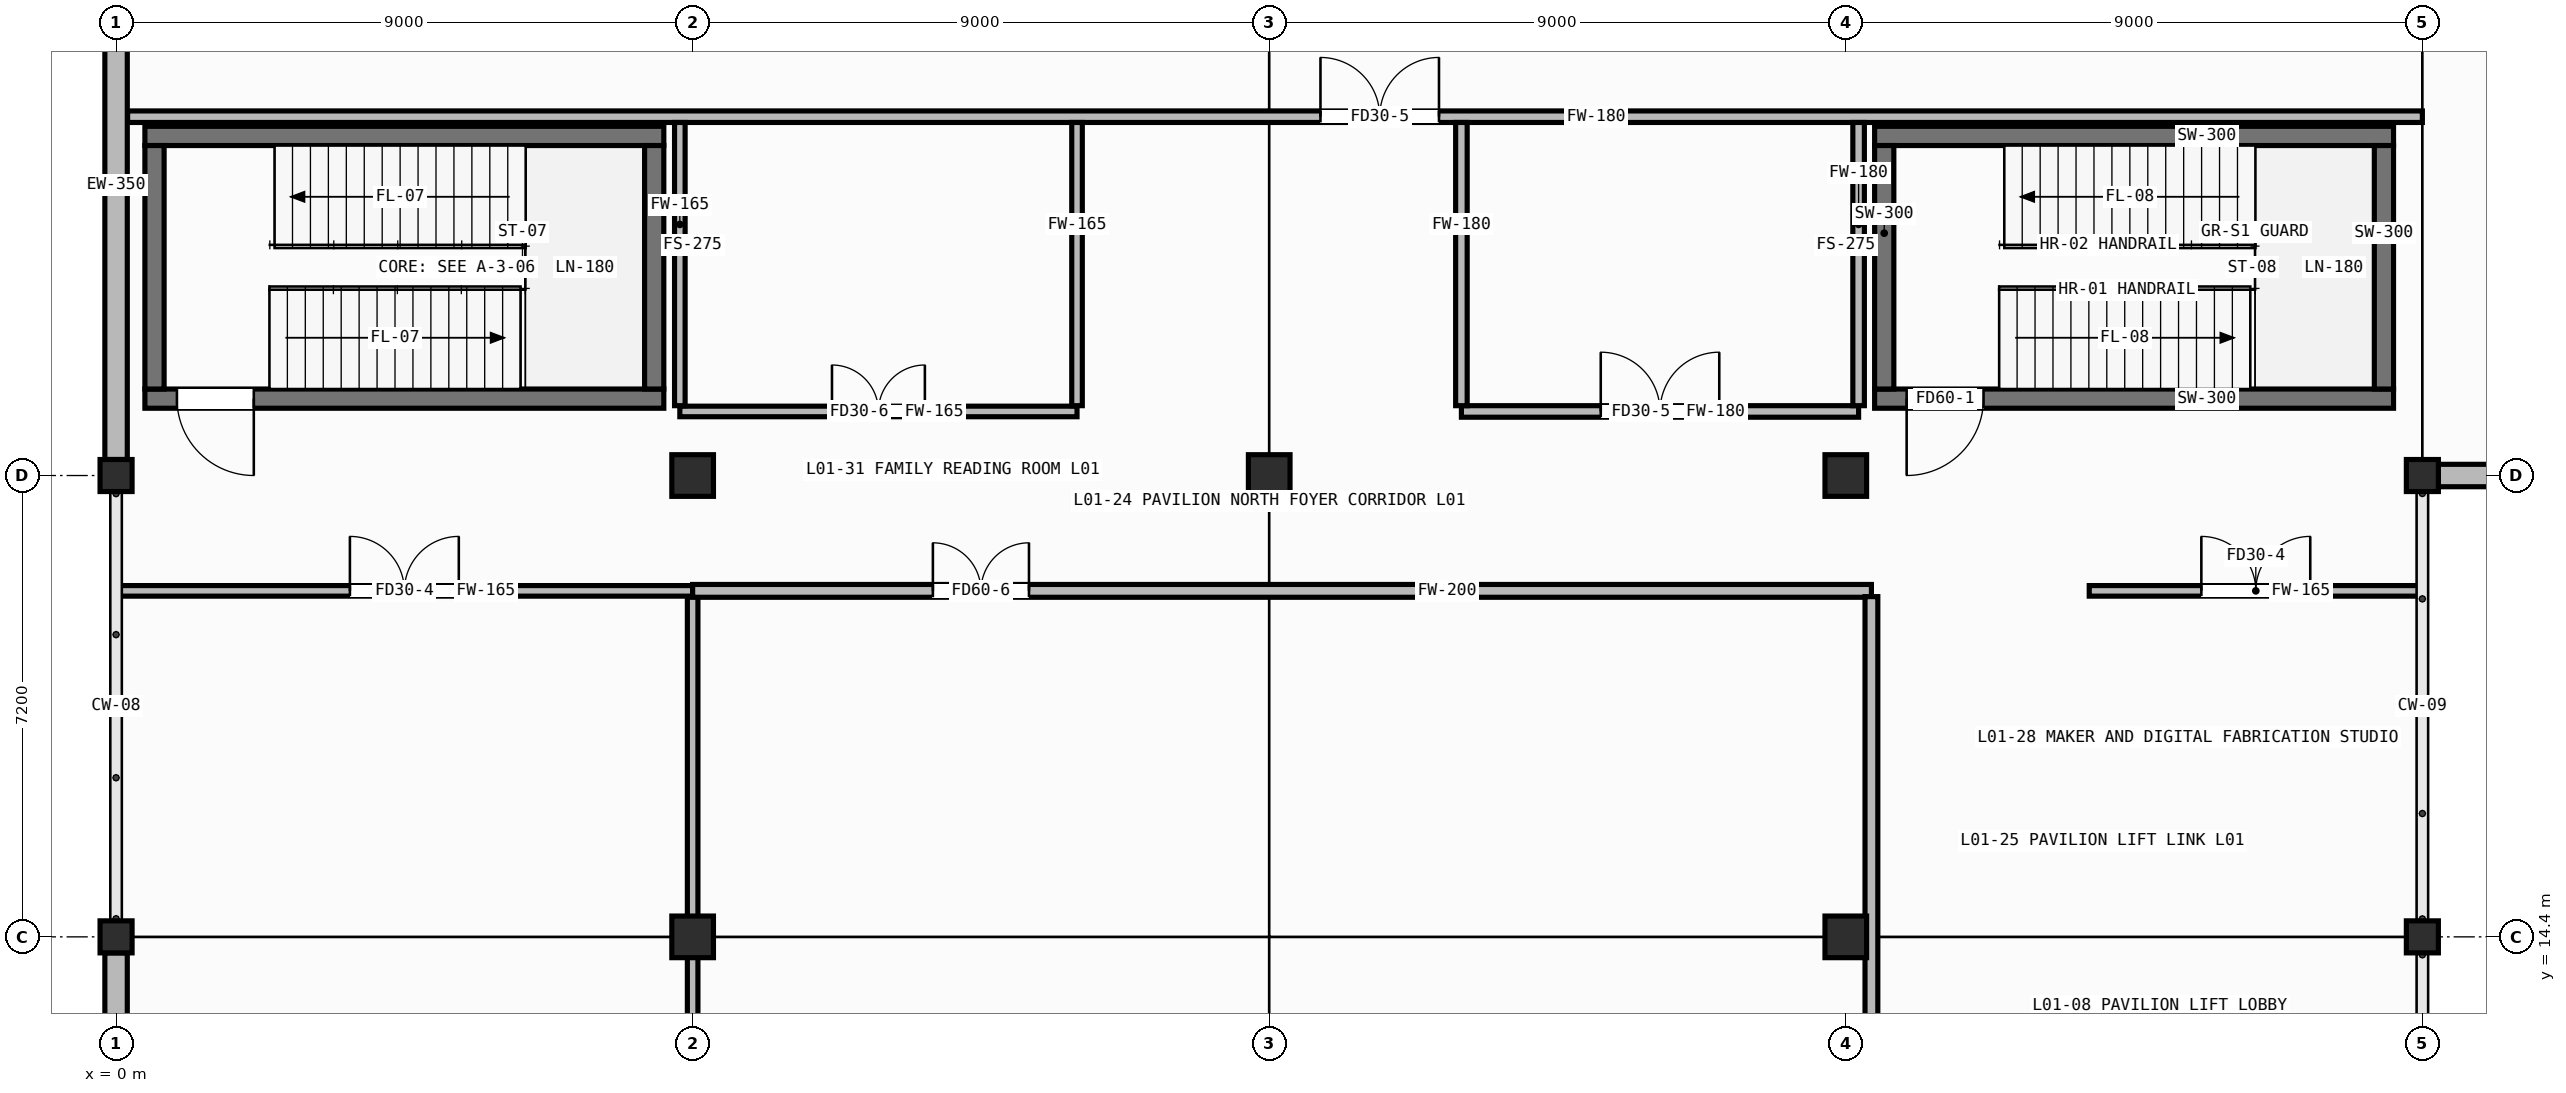
"""IFC4 building model, lengths in metres.
Left out: names, types, materials, properties, quantities, classifications, styles, units other than length and angle.
Written with IfcOpenShell. Run it as: python <this file> out.ifc"""

import sys

from ifc_helpers import new_model, si_unit, direction, frame, frame_2d, origin, origin_2d, place, context, subcontext, project, spatial, rectangle, hollow_rectangle, extrude, element, fill, save


model = new_model("IFC4")
c1 = context("Model", 3, precision=1e-05, world=origin(), true_north=direction((0.0, 1.0)))
c2 = subcontext(c1, "Body", "Model", "MODEL_VIEW")
j1 = project(units=[si_unit("LENGTHUNIT", "METRE"), si_unit("PLANEANGLEUNIT", "RADIAN")], contexts=[c1])
p1 = place(None, origin())
s1 = spatial("IfcSite", under=j1, at=p1, CompositionType="ELEMENT")
p2 = place(p1, origin())
s2 = spatial("IfcBuilding", under=s1, at=p2, CompositionType="ELEMENT")
p3 = place(p2, origin())
s3 = spatial("IfcBuildingStorey", under=s2, at=p3, CompositionType="ELEMENT", Elevation=0.0)
for number, where, z_axis, x_axis in (
    (1, (0.0, 14.4, 0.0), (0.0, 0.0, 1.0), (1.0, 0.0, 0.0)),
    (2, (0.0, 21.6, 0.0), (0.0, 0.0, 1.0), (1.0, 0.0, 0.0)),
):
    element("IfcColumn", number, at=place(p3, frame(where, z_axis=z_axis, x_axis=x_axis)), inside=s3, PredefinedType="COLUMN", context=c2, shape_type="SweptSolid", body=[
        extrude(hollow_rectangle(XDim=0.5, YDim=0.5, WallThickness=0.022, at=origin_2d()), origin(), (0.0, 0.0, 1.0), 4.8),
    ])
for number, where, z_axis, x_axis in (
    (3, (9.0, 14.4, 0.0), (0.0, 0.0, 1.0), (1.0, 0.0, 0.0)),
    (4, (9.0, 21.6, 0.0), (0.0, 0.0, 1.0), (1.0, 0.0, 0.0)),
    (5, (18.0, 21.6, 0.0), (0.0, 0.0, 1.0), (1.0, 0.0, 0.0)),
    (6, (27.0, 14.4, 0.0), (0.0, 0.0, 1.0), (1.0, 0.0, 0.0)),
    (7, (27.0, 21.6, 0.0), (0.0, 0.0, 1.0), (1.0, 0.0, 0.0)),
):
    element("IfcColumn", number, at=place(p3, frame(where, z_axis=z_axis, x_axis=x_axis)), inside=s3, PredefinedType="COLUMN", context=c2, shape_type="SweptSolid", body=[
        extrude(hollow_rectangle(XDim=0.65, YDim=0.65, WallThickness=0.025, at=origin_2d()), origin(), (0.0, 0.0, 1.0), 4.8),
    ])
for number, where, z_axis, x_axis in (
    (8, (36.0, 14.4, 0.0), (0.0, 0.0, 1.0), (1.0, 0.0, 0.0)),
    (9, (36.0, 21.6, 0.0), (0.0, 0.0, 1.0), (1.0, 0.0, 0.0)),
):
    element("IfcColumn", number, at=place(p3, frame(where, z_axis=z_axis, x_axis=x_axis)), inside=s3, PredefinedType="COLUMN", context=c2, shape_type="SweptSolid", body=[
        extrude(hollow_rectangle(XDim=0.5, YDim=0.5, WallThickness=0.022, at=origin_2d()), origin(), (0.0, 0.0, 1.0), 4.8),
    ])
p4 = place(p3, frame((36.25, 21.6, 0.0), z_axis=(0.0, 0.0, 1.0), x_axis=(1.0, 0.0, 0.0)))
e10 = element("IfcWall", 10, at=p4, inside=s3, PredefinedType="STANDARD", context=c2, shape_type="SweptSolid", body=[
    extrude(rectangle(XDim=8.5, YDim=0.35, at=frame_2d((4.25, 0.0))), origin(), (0.0, 0.0, 1.0), 4.055),
])
p5 = place(p4, frame((3.05, 0.0, 0.0)))
e11 = element("IfcOpeningElement", 11, at=p5, cuts=e10, PredefinedType="OPENING", context=c2, shape_type="SweptSolid", body=[
    extrude(rectangle(XDim=2.4, YDim=2.55, at=frame_2d((1.2, 1.275))), frame((0.0, 0.187, 0.0), z_axis=(0.0, -1.0, 0.0), x_axis=(1.0, 0.0, 0.0)), (0.0, 0.0, 1.0), 0.374),
])
p6 = place(p3, frame((0.0, 7.45, 0.0), z_axis=(0.0, 0.0, 1.0), x_axis=(0.0, 1.0, 0.0)))
e12 = element("IfcWall", 12, at=p6, inside=s3, PredefinedType="STANDARD", context=c2, shape_type="SweptSolid", body=[
    extrude(rectangle(XDim=6.7, YDim=0.35, at=frame_2d((3.35, 0.0))), origin(), (0.0, 0.0, 1.0), 4.055),
])
p7 = place(p6, frame((2.275, 0.0, 0.0)))
e13 = element("IfcOpeningElement", 13, at=p7, cuts=e12, PredefinedType="OPENING", context=c2, shape_type="SweptSolid", body=[
    extrude(rectangle(XDim=2.15, YDim=2.48, at=frame_2d((1.075, 1.24))), frame((0.0, 0.187, 0.0), z_axis=(0.0, -1.0, 0.0), x_axis=(1.0, 0.0, 0.0)), (0.0, 0.0, 1.0), 0.374),
])
p8 = place(p3, frame((0.0, 21.85, 0.0), z_axis=(0.0, 0.0, 1.0), x_axis=(0.0, 1.0, 0.0)))
e14 = element("IfcWall", 14, at=p8, inside=s3, PredefinedType="STANDARD", context=c2, shape_type="SweptSolid", body=[
    extrude(rectangle(XDim=6.7, YDim=0.35, at=frame_2d((3.35, 0.0))), origin(), (0.0, 0.0, 1.0), 4.055),
])
p9 = place(p3, frame((0.45, 22.8, 0.0), z_axis=(0.0, 0.0, 1.0), x_axis=(1.0, 0.0, 0.0)))
e15 = element("IfcWall", 15, at=p9, inside=s3, PredefinedType="SHEAR", context=c2, shape_type="SweptSolid", body=[
    extrude(rectangle(XDim=8.1, YDim=0.3, at=frame_2d((4.05, 0.0))), origin(), (0.0, 0.0, 1.0), 4.555),
])
p10 = place(p9, frame((0.5, 0.0, 0.0)))
e16 = element("IfcOpeningElement", 16, at=p10, cuts=e15, PredefinedType="OPENING", context=c2, shape_type="SweptSolid", body=[
    extrude(rectangle(XDim=1.2, YDim=2.1, at=frame_2d((0.6, 1.05))), frame((0.0, 0.162, 0.0), z_axis=(0.0, -1.0, 0.0), x_axis=(1.0, 0.0, 0.0)), (0.0, 0.0, 1.0), 0.324),
])
p11 = place(p3, frame((0.45, 26.9, 0.0), z_axis=(0.0, 0.0, 1.0), x_axis=(1.0, 0.0, 0.0)))
e17 = element("IfcWall", 17, at=p11, inside=s3, PredefinedType="SHEAR", context=c2, shape_type="SweptSolid", body=[
    extrude(rectangle(XDim=8.1, YDim=0.3, at=frame_2d((4.05, 0.0))), origin(), (0.0, 0.0, 1.0), 4.555),
])
for number, where, z_axis, x_axis in (
    (18, (0.6, 22.95, 0.0), (0.0, 0.0, 1.0), (0.0, 1.0, 0.0)),
    (19, (8.4, 22.95, 0.0), (0.0, 0.0, 1.0), (0.0, 1.0, 0.0)),
):
    element("IfcWall", number, at=place(p3, frame(where, z_axis=z_axis, x_axis=x_axis)), inside=s3, PredefinedType="SHEAR", context=c2, shape_type="SweptSolid", body=[
        extrude(rectangle(XDim=3.8, YDim=0.3, at=frame_2d((1.9, 0.0))), origin(), (0.0, 0.0, 1.0), 4.555),
    ])
p12 = place(p3, frame((27.45, 22.8, 0.0), z_axis=(0.0, 0.0, 1.0), x_axis=(1.0, 0.0, 0.0)))
e20 = element("IfcWall", 20, at=p12, inside=s3, PredefinedType="SHEAR", context=c2, shape_type="SweptSolid", body=[
    extrude(rectangle(XDim=8.1, YDim=0.3, at=frame_2d((4.05, 0.0))), origin(), (0.0, 0.0, 1.0), 4.555),
])
p13 = place(p12, frame((0.5, 0.0, 0.0)))
e21 = element("IfcOpeningElement", 21, at=p13, cuts=e20, PredefinedType="OPENING", context=c2, shape_type="SweptSolid", body=[
    extrude(rectangle(XDim=1.2, YDim=2.1, at=frame_2d((0.6, 1.05))), frame((0.0, 0.162, 0.0), z_axis=(0.0, -1.0, 0.0), x_axis=(1.0, 0.0, 0.0)), (0.0, 0.0, 1.0), 0.324),
])
p14 = place(p3, frame((27.45, 26.9, 0.0), z_axis=(0.0, 0.0, 1.0), x_axis=(1.0, 0.0, 0.0)))
e22 = element("IfcWall", 22, at=p14, inside=s3, PredefinedType="SHEAR", context=c2, shape_type="SweptSolid", body=[
    extrude(rectangle(XDim=8.1, YDim=0.3, at=frame_2d((4.05, 0.0))), origin(), (0.0, 0.0, 1.0), 4.555),
])
for number, where, z_axis, x_axis in (
    (23, (27.6, 22.95, 0.0), (0.0, 0.0, 1.0), (0.0, 1.0, 0.0)),
    (24, (35.4, 22.95, 0.0), (0.0, 0.0, 1.0), (0.0, 1.0, 0.0)),
):
    element("IfcWall", number, at=place(p3, frame(where, z_axis=z_axis, x_axis=x_axis)), inside=s3, PredefinedType="SHEAR", context=c2, shape_type="SweptSolid", body=[
        extrude(rectangle(XDim=3.8, YDim=0.3, at=frame_2d((1.9, 0.0))), origin(), (0.0, 0.0, 1.0), 4.555),
    ])
p15 = place(p3, frame((0.035, 19.8, 0.0), z_axis=(0.0, 0.0, 1.0), x_axis=(1.0, 0.0, 0.0)))
e25 = element("IfcWall", 25, at=p15, inside=s3, PredefinedType="PARTITIONING", context=c2, shape_type="SweptSolid", body=[
    extrude(rectangle(XDim=8.965, YDim=0.165, at=frame_2d((4.482, 0.0))), origin(), (0.0, 0.0, 1.0), 4.555),
])
p16 = place(p15, frame((3.615, 0.0, 0.0)))
e26 = element("IfcOpeningElement", 26, at=p16, cuts=e25, PredefinedType="OPENING", context=c2, shape_type="SweptSolid", body=[
    extrude(rectangle(XDim=1.7, YDim=2.12, at=frame_2d((0.85, 1.06))), frame((0.0, 0.094, 0.0), z_axis=(0.0, -1.0, 0.0), x_axis=(1.0, 0.0, 0.0)), (0.0, 0.0, 1.0), 0.189),
])
p17 = place(p3, frame((9.0, 0.6, 0.0), z_axis=(0.0, 0.0, 1.0), x_axis=(0.0, 1.0, 0.0)))
e27 = element("IfcWall", 27, at=p17, inside=s3, PredefinedType="PARTITIONING", context=c2, shape_type="SweptSolid", body=[
    extrude(rectangle(XDim=19.11, YDim=0.165, at=frame_2d((9.555, 0.0))), origin(), (0.0, 0.0, 1.0), 3.835),
])
p18 = place(p3, frame((9.0, 19.8, 0.0), z_axis=(0.0, 0.0, 1.0), x_axis=(1.0, 0.0, 0.0)))
e28 = element("IfcWall", 28, at=p18, inside=s3, PredefinedType="PARTITIONING", context=c2, shape_type="SweptSolid", body=[
    extrude(rectangle(XDim=18.4, YDim=0.2, at=frame_2d((9.2, 0.0))), origin(), (0.0, 0.0, 1.0), 4.555),
])
p19 = place(p18, frame((3.75, 0.0, 0.0)))
e29 = element("IfcOpeningElement", 29, at=p19, cuts=e28, PredefinedType="OPENING", context=c2, shape_type="SweptSolid", body=[
    extrude(rectangle(XDim=1.5, YDim=2.1, at=frame_2d((0.75, 1.05))), frame((0.0, 0.112, 0.0), z_axis=(0.0, -1.0, 0.0), x_axis=(1.0, 0.0, 0.0)), (0.0, 0.0, 1.0), 0.224),
])
p20 = place(p3, frame((27.4, 0.18, 0.0), z_axis=(0.0, 0.0, 1.0), x_axis=(0.0, 1.0, 0.0)))
e30 = element("IfcWall", 30, at=p20, inside=s3, PredefinedType="PARTITIONING", context=c2, shape_type="SweptSolid", body=[
    extrude(rectangle(XDim=19.53, YDim=0.2, at=frame_2d((9.765, 0.0))), origin(), (0.0, 0.0, 1.0), 4.555),
])
p21 = place(p3, frame((30.8, 19.8, 0.0), z_axis=(0.0, 0.0, 1.0), x_axis=(1.0, 0.0, 0.0)))
e31 = element("IfcWall", 31, at=p21, inside=s3, PredefinedType="PARTITIONING", context=c2, shape_type="SweptSolid", body=[
    extrude(rectangle(XDim=5.165, YDim=0.165, at=frame_2d((2.583, 0.0))), origin(), (0.0, 0.0, 1.0), 4.555),
])
p22 = place(p21, frame((1.75, 0.0, 0.0)))
e32 = element("IfcOpeningElement", 32, at=p22, cuts=e31, PredefinedType="OPENING", context=c2, shape_type="SweptSolid", body=[
    extrude(rectangle(XDim=1.7, YDim=2.12, at=frame_2d((0.85, 1.06))), frame((0.0, 0.094, 0.0), z_axis=(0.0, -1.0, 0.0), x_axis=(1.0, 0.0, 0.0)), (0.0, 0.0, 1.0), 0.189),
])
p23 = place(p3, frame((0.18, 27.2, 0.0), z_axis=(0.0, 0.0, 1.0), x_axis=(1.0, 0.0, 0.0)))
e33 = element("IfcWall", 33, at=p23, inside=s3, PredefinedType="PARTITIONING", context=c2, shape_type="SweptSolid", body=[
    extrude(rectangle(XDim=35.82, YDim=0.18, at=frame_2d((17.91, 0.0))), origin(), (0.0, 0.0, 1.0), 4.555),
])
p24 = place(p23, frame((18.62, 0.0, 0.0)))
e34 = element("IfcOpeningElement", 34, at=p24, cuts=e33, PredefinedType="OPENING", context=c2, shape_type="SweptSolid", body=[
    extrude(rectangle(XDim=1.85, YDim=2.12, at=frame_2d((0.925, 1.06))), frame((0.0, 0.102, 0.0), z_axis=(0.0, -1.0, 0.0), x_axis=(1.0, 0.0, 0.0)), (0.0, 0.0, 1.0), 0.204),
])
p25 = place(p3, frame((8.8, 22.6, 0.0), z_axis=(0.0, 0.0, 1.0), x_axis=(1.0, 0.0, 0.0)))
e35 = element("IfcWall", 35, at=p25, inside=s3, PredefinedType="PARTITIONING", context=c2, shape_type="SweptSolid", body=[
    extrude(rectangle(XDim=6.2, YDim=0.165, at=frame_2d((3.1, 0.0))), origin(), (0.0, 0.0, 1.0), 4.555),
])
p26 = place(p25, frame((2.375, 0.0, 0.0)))
e36 = element("IfcOpeningElement", 36, at=p26, cuts=e35, PredefinedType="OPENING", context=c2, shape_type="SweptSolid", body=[
    extrude(rectangle(XDim=1.45, YDim=2.1, at=frame_2d((0.725, 1.05))), frame((0.0, 0.094, 0.0), z_axis=(0.0, -1.0, 0.0), x_axis=(1.0, 0.0, 0.0)), (0.0, 0.0, 1.0), 0.189),
])
p27 = place(p3, frame((8.8, 22.69, 0.0), z_axis=(0.0, 0.0, 1.0), x_axis=(0.0, 1.0, 0.0)))
e37 = element("IfcWall", 37, at=p27, inside=s3, PredefinedType="PARTITIONING", context=c2, shape_type="SweptSolid", body=[
    extrude(rectangle(XDim=4.42, YDim=0.165, at=frame_2d((2.21, 0.0))), origin(), (0.0, 0.0, 1.0), 3.835),
])
p28 = place(p3, frame((15.0, 22.69, 0.0), z_axis=(0.0, 0.0, 1.0), x_axis=(0.0, 1.0, 0.0)))
e38 = element("IfcWall", 38, at=p28, inside=s3, PredefinedType="PARTITIONING", context=c2, shape_type="SweptSolid", body=[
    extrude(rectangle(XDim=4.42, YDim=0.165, at=frame_2d((2.21, 0.0))), origin(), (0.0, 0.0, 1.0), 4.555),
])
p29 = place(p3, frame((21.0, 22.6, 0.0), z_axis=(0.0, 0.0, 1.0), x_axis=(1.0, 0.0, 0.0)))
e39 = element("IfcWall", 39, at=p29, inside=s3, PredefinedType="PARTITIONING", context=c2, shape_type="SweptSolid", body=[
    extrude(rectangle(XDim=6.2, YDim=0.18, at=frame_2d((3.1, 0.0))), origin(), (0.0, 0.0, 1.0), 4.555),
])
p30 = place(p29, frame((2.175, 0.0, 0.0)))
e40 = element("IfcOpeningElement", 40, at=p30, cuts=e39, PredefinedType="OPENING", context=c2, shape_type="SweptSolid", body=[
    extrude(rectangle(XDim=1.85, YDim=2.12, at=frame_2d((0.925, 1.06))), frame((0.0, 0.102, 0.0), z_axis=(0.0, -1.0, 0.0), x_axis=(1.0, 0.0, 0.0)), (0.0, 0.0, 1.0), 0.204),
])
p31 = place(p3, frame((21.0, 22.69, 0.0), z_axis=(0.0, 0.0, 1.0), x_axis=(0.0, 1.0, 0.0)))
e41 = element("IfcWall", 41, at=p31, inside=s3, PredefinedType="PARTITIONING", context=c2, shape_type="SweptSolid", body=[
    extrude(rectangle(XDim=4.42, YDim=0.18, at=frame_2d((2.21, 0.0))), origin(), (0.0, 0.0, 1.0), 4.555),
])
p32 = place(p3, frame((27.2, 22.69, 0.0), z_axis=(0.0, 0.0, 1.0), x_axis=(0.0, 1.0, 0.0)))
e42 = element("IfcWall", 42, at=p32, inside=s3, PredefinedType="PARTITIONING", context=c2, shape_type="SweptSolid", body=[
    extrude(rectangle(XDim=4.42, YDim=0.18, at=frame_2d((2.21, 0.0))), origin(), (0.0, 0.0, 1.0), 3.835),
])
p33 = place(p10, frame((1.2, 0.0, 0.0), z_axis=(0.0, 0.0, 1.0), x_axis=(-1.0, 0.0, 0.0)))
e43 = element("IfcDoor", 43, at=p33, inside=s3, OperationType="SINGLE_SWING_LEFT", PredefinedType="DOOR", context=c2, shape_type="SweptSolid", body=[
    extrude(rectangle(XDim=1.2, YDim=2.1, at=frame_2d((0.6, 1.05))), frame((0.0, 0.025, 0.0), z_axis=(0.0, -1.0, 0.0), x_axis=(1.0, 0.0, 0.0)), (0.0, 0.0, 1.0), 0.05),
])
fill(e16, e43)
p34 = place(p13, frame((1.2, 0.0, 0.0), z_axis=(0.0, 0.0, 1.0), x_axis=(-1.0, 0.0, 0.0)))
e44 = element("IfcDoor", 44, at=p34, inside=s3, OperationType="SINGLE_SWING_RIGHT", PredefinedType="DOOR", context=c2, shape_type="SweptSolid", body=[
    extrude(rectangle(XDim=1.2, YDim=2.1, at=frame_2d((0.6, 1.05))), frame((0.0, 0.025, 0.0), z_axis=(0.0, -1.0, 0.0), x_axis=(1.0, 0.0, 0.0)), (0.0, 0.0, 1.0), 0.05),
])
fill(e21, e44)
p35 = place(p16, origin())
e45 = element("IfcDoor", 45, at=p35, inside=s3, OperationType="DOUBLE_DOOR_SINGLE_SWING", PredefinedType="DOOR", context=c2, shape_type="SweptSolid", body=[
    extrude(rectangle(XDim=1.7, YDim=2.12, at=frame_2d((0.85, 1.06))), frame((0.0, 0.025, 0.0), z_axis=(0.0, -1.0, 0.0), x_axis=(1.0, 0.0, 0.0)), (0.0, 0.0, 1.0), 0.05),
])
fill(e26, e45)
p36 = place(p19, origin())
e46 = element("IfcDoor", 46, at=p36, inside=s3, OperationType="DOUBLE_DOOR_SINGLE_SWING", PredefinedType="DOOR", context=c2, shape_type="SweptSolid", body=[
    extrude(rectangle(XDim=1.5, YDim=2.1, at=frame_2d((0.75, 1.05))), frame((0.0, 0.025, 0.0), z_axis=(0.0, -1.0, 0.0), x_axis=(1.0, 0.0, 0.0)), (0.0, 0.0, 1.0), 0.05),
])
fill(e29, e46)
p37 = place(p22, origin())
e47 = element("IfcDoor", 47, at=p37, inside=s3, OperationType="DOUBLE_DOOR_SINGLE_SWING", PredefinedType="DOOR", context=c2, shape_type="SweptSolid", body=[
    extrude(rectangle(XDim=1.7, YDim=2.12, at=frame_2d((0.85, 1.06))), frame((0.0, 0.025, 0.0), z_axis=(0.0, -1.0, 0.0), x_axis=(1.0, 0.0, 0.0)), (0.0, 0.0, 1.0), 0.05),
])
fill(e32, e47)
p38 = place(p24, origin())
e48 = element("IfcDoor", 48, at=p38, inside=s3, OperationType="DOUBLE_DOOR_SINGLE_SWING", PredefinedType="DOOR", context=c2, shape_type="SweptSolid", body=[
    extrude(rectangle(XDim=1.85, YDim=2.12, at=frame_2d((0.925, 1.06))), frame((0.0, 0.025, 0.0), z_axis=(0.0, -1.0, 0.0), x_axis=(1.0, 0.0, 0.0)), (0.0, 0.0, 1.0), 0.05),
])
fill(e34, e48)
p39 = place(p26, origin())
e49 = element("IfcDoor", 49, at=p39, inside=s3, OperationType="DOUBLE_DOOR_SINGLE_SWING", PredefinedType="DOOR", context=c2, shape_type="SweptSolid", body=[
    extrude(rectangle(XDim=1.45, YDim=2.1, at=frame_2d((0.725, 1.05))), frame((0.0, 0.025, 0.0), z_axis=(0.0, -1.0, 0.0), x_axis=(1.0, 0.0, 0.0)), (0.0, 0.0, 1.0), 0.05),
])
fill(e36, e49)
p40 = place(p30, origin())
e50 = element("IfcDoor", 50, at=p40, inside=s3, OperationType="DOUBLE_DOOR_SINGLE_SWING", PredefinedType="DOOR", context=c2, shape_type="SweptSolid", body=[
    extrude(rectangle(XDim=1.85, YDim=2.12, at=frame_2d((0.925, 1.06))), frame((0.0, 0.025, 0.0), z_axis=(0.0, -1.0, 0.0), x_axis=(1.0, 0.0, 0.0)), (0.0, 0.0, 1.0), 0.05),
])
fill(e40, e50)
save(model, sys.argv[1])
